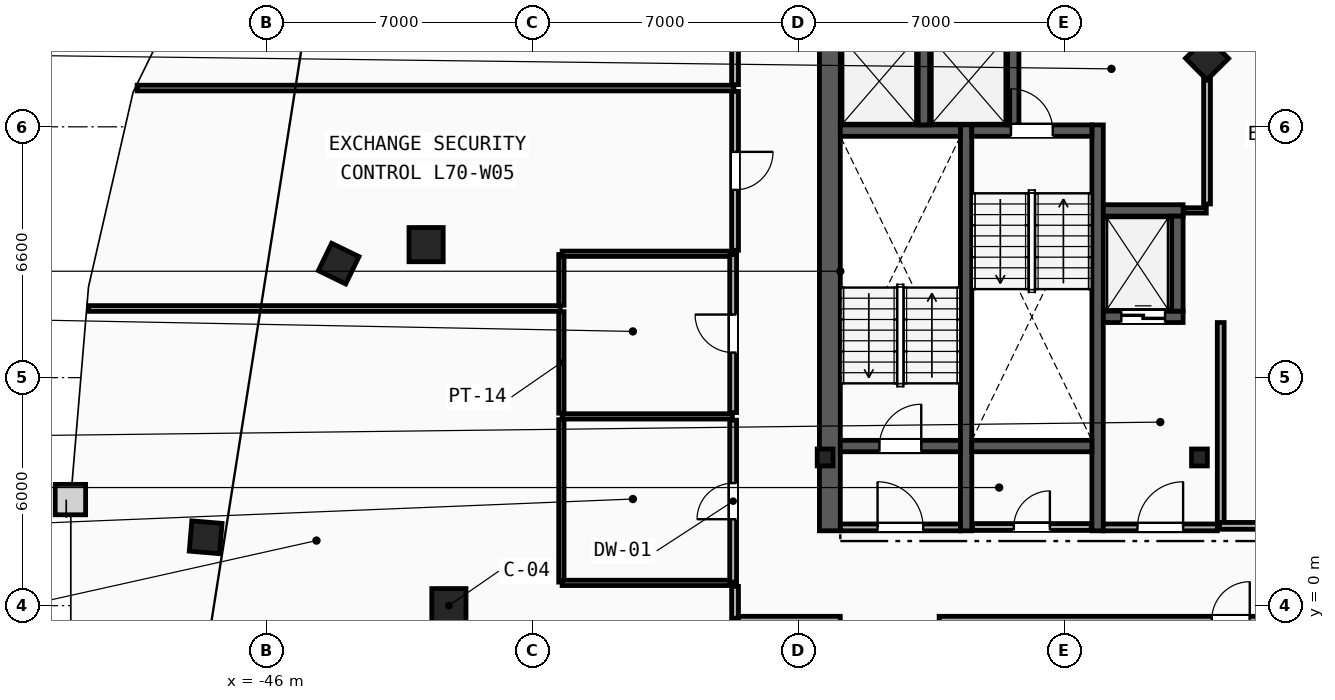
"""IFC4 building model, lengths in metres.
Left out: names, types, materials, properties, quantities, classifications, styles, units other than length and angle.
Written with IfcOpenShell. Run it as: python <this file> out.ifc"""

import sys

from ifc_helpers import new_model, si_unit, direction, frame, frame_2d, origin, origin_2d, place, context, subcontext, project, spatial, rectangle, i_section, extrude, element, fill, save


model = new_model("IFC4")
c1 = context("Model", 3, precision=1e-05, world=origin(), true_north=direction((0.0, 1.0)))
c2 = subcontext(c1, "Body", "Model", "MODEL_VIEW")
j1 = project(units=[si_unit("LENGTHUNIT", "METRE"), si_unit("PLANEANGLEUNIT", "RADIAN")], contexts=[c1])
p1 = place(None, origin())
s1 = spatial("IfcSite", under=j1, at=p1, CompositionType="ELEMENT")
p2 = place(p1, origin())
s2 = spatial("IfcBuilding", under=s1, at=p2, CompositionType="ELEMENT")
p3 = place(p2, frame((0.0, 0.0, 264.8)))
s3 = spatial("IfcBuildingStorey", under=s2, at=p3, CompositionType="ELEMENT", Elevation=264.8)
for number, where, z_axis, x_axis in (
    (1, (-31.3, 3.9, 0.0), (0.0, 0.0, 1.0), (1.0, 0.0, 0.0)),
    (2, (-21.45, 3.9, 0.0), (0.0, 0.0, 1.0), (1.0, 0.0, 0.0)),
):
    element("IfcColumn", number, at=place(p3, frame(where, z_axis=z_axis, x_axis=x_axis)), inside=s3, PredefinedType="COLUMN", context=c2, shape_type="SweptSolid", body=[
        extrude(i_section(OverallWidth=0.416, OverallDepth=0.446, WebThickness=0.039, FlangeThickness=0.063, FilletRadius=0.018, at=origin_2d()), origin(), (0.0, 0.0, 1.0), 3.6),
    ])
for number, where, z_axis, x_axis in (
    (3, (-41.2, 0.0, 0.0), (0.0, 0.0, 1.0), (1.0, 0.0, 0.0)),
    (4, (-41.8, 9.5, 0.0), (0.0, 0.0, 1.0), (1.0, 0.0, 0.0)),
):
    element("IfcColumn", number, at=place(p3, frame(where, z_axis=z_axis, x_axis=x_axis)), inside=s3, PredefinedType="COLUMN", context=c2, shape_type="SweptSolid", body=[
        extrude(rectangle(XDim=0.9, YDim=0.9, at=origin_2d()), origin(), (0.0, 0.0, 1.0), 3.6),
    ])
for number, where, z_axis, x_axis in (
    (5, (-21.25, 14.4, 0.0), (0.0, 0.0, 1.0), (-0.703, 0.711, 0.0)),
    (6, (-44.1, 9.0, 0.0), (0.0, 0.0, 1.0), (-0.437, -0.899, 0.0)),
    (7, (-47.6, 1.8, 0.0), (0.0, 0.0, 1.0), (-0.084, -0.997, 0.0)),
):
    element("IfcColumn", number, at=place(p3, frame(where, z_axis=z_axis, x_axis=x_axis)), inside=s3, PredefinedType="COLUMN", context=c2, shape_type="SweptSolid", body=[
        extrude(rectangle(XDim=0.8, YDim=0.8, at=origin_2d()), origin(), (0.0, 0.0, 1.0), 3.6),
    ])
p4 = place(p3, frame((-31.175, 1.97, 0.0), z_axis=(0.0, 0.0, 1.0), x_axis=(0.0, 1.0, 0.0)))
e8 = element("IfcWall", 8, at=p4, inside=s3, PredefinedType="SHEAR", context=c2, shape_type="SweptSolid", body=[
    extrude(rectangle(XDim=13.33, YDim=0.55, at=frame_2d((6.665, 0.0))), origin(), (0.0, 0.0, 1.0), 3.34),
])
for number, where, z_axis, x_axis in (
    (9, (-27.59, 1.97, 0.0), (0.0, 0.0, 1.0), (0.0, 1.0, 0.0)),
    (10, (-24.13, 1.97, 0.0), (0.0, 0.0, 1.0), (0.0, 1.0, 0.0)),
):
    element("IfcWall", number, at=place(p3, frame(where, z_axis=z_axis, x_axis=x_axis)), inside=s3, PredefinedType="SHEAR", context=c2, shape_type="SweptSolid", body=[
        extrude(rectangle(XDim=10.68, YDim=0.3, at=frame_2d((5.34, 0.0))), origin(), (0.0, 0.0, 1.0), 3.34),
    ])
p5 = place(p3, frame((-30.9, 4.2, 0.0), z_axis=(0.0, 0.0, 1.0), x_axis=(1.0, 0.0, 0.0)))
e11 = element("IfcWall", 11, at=p5, inside=s3, PredefinedType="SHEAR", context=c2, shape_type="SweptSolid", body=[
    extrude(rectangle(XDim=3.16, YDim=0.3, at=frame_2d((1.58, 0.0))), origin(), (0.0, 0.0, 1.0), 3.34),
])
p6 = place(p5, frame((1.03, 0.0, 0.0)))
e12 = element("IfcOpeningElement", 12, at=p6, cuts=e11, PredefinedType="OPENING", context=c2, shape_type="SweptSolid", body=[
    extrude(rectangle(XDim=1.1, YDim=2.15, at=frame_2d((0.55, 1.075))), frame((0.0, 0.16, 0.0), z_axis=(0.0, -1.0, 0.0), x_axis=(1.0, 0.0, 0.0)), (0.0, 0.0, 1.0), 0.32),
])
p7 = place(p3, frame((-30.9, 12.5, 0.0), z_axis=(0.0, 0.0, 1.0), x_axis=(1.0, 0.0, 0.0)))
e13 = element("IfcWall", 13, at=p7, inside=s3, PredefinedType="SHEAR", context=c2, shape_type="SweptSolid", body=[
    extrude(rectangle(XDim=3.16, YDim=0.3, at=frame_2d((1.58, 0.0))), origin(), (0.0, 0.0, 1.0), 3.34),
])
p8 = place(p3, frame((-27.44, 12.5, 0.0), z_axis=(0.0, 0.0, 1.0), x_axis=(1.0, 0.0, 0.0)))
e14 = element("IfcWall", 14, at=p8, inside=s3, PredefinedType="SHEAR", context=c2, shape_type="SweptSolid", body=[
    extrude(rectangle(XDim=3.16, YDim=0.3, at=frame_2d((1.58, 0.0))), origin(), (0.0, 0.0, 1.0), 3.34),
])
p9 = place(p8, frame((1.03, 0.0, 0.0)))
e15 = element("IfcOpeningElement", 15, at=p9, cuts=e14, PredefinedType="OPENING", context=c2, shape_type="SweptSolid", body=[
    extrude(rectangle(XDim=1.1, YDim=2.15, at=frame_2d((0.55, 1.075))), frame((0.0, 0.16, 0.0), z_axis=(0.0, -1.0, 0.0), x_axis=(1.0, 0.0, 0.0)), (0.0, 0.0, 1.0), 0.32),
])
p10 = place(p3, frame((-27.44, 4.2, 0.0), z_axis=(0.0, 0.0, 1.0), x_axis=(1.0, 0.0, 0.0)))
e16 = element("IfcWall", 16, at=p10, inside=s3, PredefinedType="SHEAR", context=c2, shape_type="SweptSolid", body=[
    extrude(rectangle(XDim=3.16, YDim=0.3, at=frame_2d((1.58, 0.0))), origin(), (0.0, 0.0, 1.0), 3.34),
])
p11 = place(p3, frame((-20.89, 2.15, 0.0), z_axis=(0.0, 0.0, 1.0), x_axis=(0.0, 1.0, 0.0)))
e17 = element("IfcWall", 17, at=p11, inside=s3, PredefinedType="PARTITIONING", context=c2, shape_type="SweptSolid", body=[
    extrude(rectangle(XDim=5.3, YDim=0.18, at=frame_2d((2.65, 0.0))), origin(), (0.0, 0.0, 1.0), 3.34),
])
p12 = place(p3, frame((-23.98, 2.06, 0.0), z_axis=(0.0, 0.0, 1.0), x_axis=(1.0, 0.0, 0.0)))
e18 = element("IfcWall", 18, at=p12, inside=s3, PredefinedType="PARTITIONING", context=c2, shape_type="SweptSolid", body=[
    extrude(rectangle(XDim=3.0, YDim=0.18, at=frame_2d((1.5, 0.0))), origin(), (0.0, 0.0, 1.0), 3.34),
])
p13 = place(p12, frame((0.9, 0.0, 0.0)))
e19 = element("IfcOpeningElement", 19, at=p13, cuts=e18, PredefinedType="OPENING", context=c2, shape_type="SweptSolid", body=[
    extrude(rectangle(XDim=1.2, YDim=2.15, at=frame_2d((0.6, 1.075))), frame((0.0, 0.1, 0.0), z_axis=(0.0, -1.0, 0.0), x_axis=(1.0, 0.0, 0.0)), (0.0, 0.0, 1.0), 0.2),
])
p14 = place(p3, frame((-30.9, 2.06, 0.0), z_axis=(0.0, 0.0, 1.0), x_axis=(1.0, 0.0, 0.0)))
e20 = element("IfcWall", 20, at=p14, inside=s3, PredefinedType="PARTITIONING", context=c2, shape_type="SweptSolid", body=[
    extrude(rectangle(XDim=3.16, YDim=0.18, at=frame_2d((1.58, 0.0))), origin(), (0.0, 0.0, 1.0), 3.34),
])
p15 = place(p14, frame((0.98, 0.0, 0.0)))
e21 = element("IfcOpeningElement", 21, at=p15, cuts=e20, PredefinedType="OPENING", context=c2, shape_type="SweptSolid", body=[
    extrude(rectangle(XDim=1.2, YDim=2.15, at=frame_2d((0.6, 1.075))), frame((0.0, 0.1, 0.0), z_axis=(0.0, -1.0, 0.0), x_axis=(1.0, 0.0, 0.0)), (0.0, 0.0, 1.0), 0.2),
])
p16 = place(p3, frame((-23.98, 7.6, 0.0), z_axis=(0.0, 0.0, 1.0), x_axis=(1.0, 0.0, 0.0)))
e22 = element("IfcWall", 22, at=p16, inside=s3, PredefinedType="SHEAR", context=c2, shape_type="SweptSolid", body=[
    extrude(rectangle(XDim=2.1, YDim=0.3, at=frame_2d((1.05, 0.0))), origin(), (0.0, 0.0, 1.0), 3.34),
])
p17 = place(p16, frame((0.475, 0.0, 0.0)))
e23 = element("IfcOpeningElement", 23, at=p17, cuts=e22, PredefinedType="OPENING", context=c2, shape_type="SweptSolid", body=[
    extrude(rectangle(XDim=1.15, YDim=2.2, at=frame_2d((0.575, 1.1))), frame((0.0, 0.16, 0.0), z_axis=(0.0, -1.0, 0.0), x_axis=(1.0, 0.0, 0.0)), (0.0, 0.0, 1.0), 0.32),
])
p18 = place(p3, frame((-23.98, 10.4, 0.0), z_axis=(0.0, 0.0, 1.0), x_axis=(1.0, 0.0, 0.0)))
e24 = element("IfcWall", 24, at=p18, inside=s3, PredefinedType="SHEAR", context=c2, shape_type="SweptSolid", body=[
    extrude(rectangle(XDim=2.1, YDim=0.3, at=frame_2d((1.05, 0.0))), origin(), (0.0, 0.0, 1.0), 3.34),
])
p19 = place(p3, frame((-22.03, 7.75, 0.0), z_axis=(0.0, 0.0, 1.0), x_axis=(0.0, 1.0, 0.0)))
e25 = element("IfcWall", 25, at=p19, inside=s3, PredefinedType="SHEAR", context=c2, shape_type="SweptSolid", body=[
    extrude(rectangle(XDim=2.5, YDim=0.3, at=frame_2d((1.25, 0.0))), origin(), (0.0, 0.0, 1.0), 3.34),
])
for number, where, z_axis, x_axis in (
    (26, (-28.7, 12.65, 0.0), (0.0, 0.0, 1.0), (0.0, 1.0, 0.0)),
    (27, (-26.35, 12.65, 0.0), (0.0, 0.0, 1.0), (0.0, 1.0, 0.0)),
):
    element("IfcWall", number, at=place(p3, frame(where, z_axis=z_axis, x_axis=x_axis)), inside=s3, PredefinedType="SHEAR", context=c2, shape_type="SweptSolid", body=[
        extrude(rectangle(XDim=2.3, YDim=0.3, at=frame_2d((1.15, 0.0))), origin(), (0.0, 0.0, 1.0), 3.34),
    ])
p20 = place(p3, frame((-21.86, 10.4, 0.0), z_axis=(0.0, 0.0, 1.0), x_axis=(1.0, 0.0, 0.0)))
e28 = element("IfcWall", 28, at=p20, inside=s3, PredefinedType="PARTITIONING", context=c2, shape_type="SweptSolid", body=[
    extrude(rectangle(XDim=0.59, YDim=0.14, at=frame_2d((0.295, 0.0))), origin(), (0.0, 0.0, 1.0), 3.34),
])
p21 = place(p3, frame((-21.25, 10.57, 0.0), z_axis=(0.0, 0.0, 1.0), x_axis=(0.0, 1.0, 0.0)))
e29 = element("IfcWall", 29, at=p21, inside=s3, PredefinedType="PARTITIONING", context=c2, shape_type="SweptSolid", body=[
    extrude(rectangle(XDim=4.36, YDim=0.18, at=frame_2d((2.18, 0.0))), origin(), (0.0, 0.0, 1.0), 3.34),
])
p22 = place(p3, frame((-27.42, 2.07, 0.0), z_axis=(0.0, 0.0, 1.0), x_axis=(1.0, 0.0, 0.0)))
e30 = element("IfcWall", 30, at=p22, inside=s3, PredefinedType="PARTITIONING", context=c2, shape_type="SweptSolid", body=[
    extrude(rectangle(XDim=3.12, YDim=0.18, at=frame_2d((1.56, 0.0))), origin(), (0.0, 0.0, 1.0), 3.34),
])
p23 = place(p22, frame((1.085, 0.0, 0.0)))
e31 = element("IfcOpeningElement", 31, at=p23, cuts=e30, PredefinedType="OPENING", context=c2, shape_type="SweptSolid", body=[
    extrude(rectangle(XDim=0.95, YDim=2.1, at=frame_2d((0.475, 1.05))), frame((0.0, 0.1, 0.0), z_axis=(0.0, -1.0, 0.0), x_axis=(1.0, 0.0, 0.0)), (0.0, 0.0, 1.0), 0.2),
])
p24 = place(p3, frame((-38.24, 0.62, 0.0), z_axis=(0.0, 0.0, 1.0), x_axis=(0.0, 1.0, 0.0)))
e32 = element("IfcWall", 32, at=p24, inside=s3, PredefinedType="PARTITIONING", context=c2, shape_type="SweptSolid", body=[
    extrude(rectangle(XDim=4.275, YDim=0.14, at=frame_2d((2.137, 0.0))), origin(), (0.0, 0.0, 1.0), 3.34),
])
p25 = place(p3, frame((-38.24, 5.065, 0.0), z_axis=(0.0, 0.0, 1.0), x_axis=(0.0, 1.0, 0.0)))
e33 = element("IfcWall", 33, at=p25, inside=s3, PredefinedType="PARTITIONING", context=c2, shape_type="SweptSolid", body=[
    extrude(rectangle(XDim=2.67, YDim=0.14, at=frame_2d((1.335, 0.0))), origin(), (0.0, 0.0, 1.0), 3.34),
])
p26 = place(p3, frame((-38.24, 7.905, 0.0), z_axis=(0.0, 0.0, 1.0), x_axis=(0.0, 1.0, 0.0)))
e34 = element("IfcWall", 34, at=p26, inside=s3, PredefinedType="PARTITIONING", context=c2, shape_type="SweptSolid", body=[
    extrude(rectangle(XDim=1.335, YDim=0.14, at=frame_2d((0.667, 0.0))), origin(), (0.0, 0.0, 1.0), 3.34),
])
for number, where, z_axis, x_axis in (
    (35, (-38.22, 0.6, 0.0), (0.0, 0.0, 1.0), (1.0, 0.0, 0.0)),
    (36, (-38.22, 4.98, 0.0), (0.0, 0.0, 1.0), (1.0, 0.0, 0.0)),
    (37, (-38.22, 9.26, 0.0), (0.0, 0.0, 1.0), (1.0, 0.0, 0.0)),
):
    element("IfcWall", number, at=place(p3, frame(where, z_axis=z_axis, x_axis=x_axis)), inside=s3, PredefinedType="PARTITIONING", context=c2, shape_type="SweptSolid", body=[
        extrude(rectangle(XDim=4.48, YDim=0.14, at=frame_2d((2.24, 0.0))), origin(), (0.0, 0.0, 1.0), 3.34),
    ])
p27 = place(p3, frame((-33.72, 0.62, 0.0), z_axis=(0.0, 0.0, 1.0), x_axis=(0.0, 1.0, 0.0)))
e38 = element("IfcWall", 38, at=p27, inside=s3, PredefinedType="PARTITIONING", context=c2, shape_type="SweptSolid", body=[
    extrude(rectangle(XDim=4.26, YDim=0.18, at=frame_2d((2.13, 0.0))), origin(), (0.0, 0.0, 1.0), 3.34),
])
p28 = place(p27, frame((1.655, 0.0, 0.0)))
e39 = element("IfcOpeningElement", 39, at=p28, cuts=e38, PredefinedType="OPENING", context=c2, shape_type="SweptSolid", body=[
    extrude(rectangle(XDim=0.95, YDim=2.1, at=frame_2d((0.475, 1.05))), frame((0.0, 0.1, 0.0), z_axis=(0.0, -1.0, 0.0), x_axis=(1.0, 0.0, 0.0)), (0.0, 0.0, 1.0), 0.2),
])
p29 = place(p3, frame((-33.72, 5.08, 0.0), z_axis=(0.0, 0.0, 1.0), x_axis=(0.0, 1.0, 0.0)))
e40 = element("IfcWall", 40, at=p29, inside=s3, PredefinedType="PARTITIONING", context=c2, shape_type="SweptSolid", body=[
    extrude(rectangle(XDim=4.16, YDim=0.18, at=frame_2d((2.08, 0.0))), origin(), (0.0, 0.0, 1.0), 3.34),
])
p30 = place(p29, frame((1.58, 0.0, 0.0)))
e41 = element("IfcOpeningElement", 41, at=p30, cuts=e40, PredefinedType="OPENING", context=c2, shape_type="SweptSolid", body=[
    extrude(rectangle(XDim=1.0, YDim=2.15, at=frame_2d((0.5, 1.075))), frame((0.0, 0.1, 0.0), z_axis=(0.0, -1.0, 0.0), x_axis=(1.0, 0.0, 0.0)), (0.0, 0.0, 1.0), 0.2),
])
p31 = place(p3, frame((-50.681, 7.82, 0.0), z_axis=(0.0, 0.0, 1.0), x_axis=(1.0, 0.0, 0.0)))
e42 = element("IfcWall", 42, at=p31, inside=s3, PredefinedType="PARTITIONING", context=c2, shape_type="SweptSolid", body=[
    extrude(rectangle(XDim=12.411, YDim=0.15, at=frame_2d((6.205, 0.0))), origin(), (0.0, 0.0, 1.0), 3.34),
])
p32 = place(p3, frame((-49.404, 13.62, 0.0), z_axis=(0.0, 0.0, 1.0), x_axis=(1.0, 0.0, 0.0)))
e43 = element("IfcWall", 43, at=p32, inside=s3, PredefinedType="PARTITIONING", context=c2, shape_type="SweptSolid", body=[
    extrude(rectangle(XDim=15.704, YDim=0.15, at=frame_2d((7.852, 0.0))), origin(), (0.0, 0.0, 1.0), 3.34),
])
p33 = place(p3, frame((-28.3, -0.37, 0.0), z_axis=(0.0, 0.0, 1.0), x_axis=(1.0, 0.0, 0.0)))
e44 = element("IfcWall", 44, at=p33, inside=s3, PredefinedType="PARTITIONING", context=c2, shape_type="SweptSolid", body=[
    extrude(rectangle(XDim=15.349, YDim=0.18, at=frame_2d((7.675, 0.0))), origin(), (0.0, 0.0, 1.0), 3.34),
])
p34 = place(p33, frame((7.175, 0.0, 0.0)))
e45 = element("IfcOpeningElement", 45, at=p34, cuts=e44, PredefinedType="OPENING", context=c2, shape_type="SweptSolid", body=[
    extrude(rectangle(XDim=1.0, YDim=2.15, at=frame_2d((0.5, 1.075))), frame((0.0, 0.1, 0.0), z_axis=(0.0, -1.0, 0.0), x_axis=(1.0, 0.0, 0.0)), (0.0, 0.0, 1.0), 0.2),
])
p35 = place(p3, frame((-33.628, -0.37, 0.0), z_axis=(0.0, 0.0, 1.0), x_axis=(1.0, 0.0, 0.0)))
e46 = element("IfcWall", 46, at=p35, inside=s3, PredefinedType="PARTITIONING", context=c2, shape_type="SweptSolid", body=[
    extrude(rectangle(XDim=2.729, YDim=0.18, at=frame_2d((1.364, 0.0))), origin(), (0.0, 0.0, 1.0), 3.34),
])
p36 = place(p3, frame((-33.67, 0.509, 0.0), z_axis=(0.0, 0.0, 1.0), x_axis=(0.0, -1.0, 0.0)))
e47 = element("IfcWall", 47, at=p36, inside=s3, PredefinedType="PARTITIONING", context=c2, shape_type="SweptSolid", body=[
    extrude(rectangle(XDim=0.837, YDim=0.18, at=frame_2d((0.418, 0.0))), origin(), (0.0, 0.0, 1.0), 3.34),
])
p37 = place(p3, frame((-33.67, 13.53, 0.0), z_axis=(0.0, 0.0, 1.0), x_axis=(0.0, -1.0, 0.0)))
e48 = element("IfcWall", 48, at=p37, inside=s3, PredefinedType="PARTITIONING", context=c2, shape_type="SweptSolid", body=[
    extrude(rectangle(XDim=4.179, YDim=0.18, at=frame_2d((2.089, 0.0))), origin(), (0.0, 0.0, 1.0), 3.34),
])
p38 = place(p37, frame((1.589, 0.0, 0.0)))
e49 = element("IfcOpeningElement", 49, at=p38, cuts=e48, PredefinedType="OPENING", context=c2, shape_type="SweptSolid", body=[
    extrude(rectangle(XDim=1.0, YDim=2.15, at=frame_2d((0.5, 1.075))), frame((0.0, 0.1, 0.0), z_axis=(0.0, -1.0, 0.0), x_axis=(1.0, 0.0, 0.0)), (0.0, 0.0, 1.0), 0.2),
])
p39 = place(p3, frame((-16.9, 2.1, 0.0), z_axis=(0.0, 0.0, 1.0), x_axis=(-1.0, 0.0, 0.0)))
e50 = element("IfcWall", 50, at=p39, inside=s3, PredefinedType="PARTITIONING", context=c2, shape_type="SweptSolid", body=[
    extrude(rectangle(XDim=4.02, YDim=0.18, at=frame_2d((2.01, 0.0))), origin(), (0.0, 0.0, 1.0), 3.34),
])
p40 = place(p39, frame((1.51, 0.0, 0.0)))
e51 = element("IfcOpeningElement", 51, at=p40, cuts=e50, PredefinedType="OPENING", context=c2, shape_type="SweptSolid", body=[
    extrude(rectangle(XDim=1.0, YDim=2.15, at=frame_2d((0.5, 1.075))), frame((0.0, 0.1, 0.0), z_axis=(0.0, -1.0, 0.0), x_axis=(1.0, 0.0, 0.0)), (0.0, 0.0, 1.0), 0.2),
])
p41 = place(p3, frame((-33.67, 17.428, 0.0), z_axis=(0.0, 0.0, 1.0), x_axis=(0.0, -1.0, 0.0)))
e52 = element("IfcWall", 52, at=p41, inside=s3, PredefinedType="PARTITIONING", context=c2, shape_type="SweptSolid", body=[
    extrude(rectangle(XDim=3.719, YDim=0.18, at=frame_2d((1.859, 0.0))), origin(), (0.0, 0.0, 1.0), 3.34),
])
p42 = place(p41, frame((1.359, 0.0, 0.0)))
e53 = element("IfcOpeningElement", 53, at=p42, cuts=e52, PredefinedType="OPENING", context=c2, shape_type="SweptSolid", body=[
    extrude(rectangle(XDim=1.0, YDim=2.15, at=frame_2d((0.5, 1.075))), frame((0.0, 0.1, 0.0), z_axis=(0.0, -1.0, 0.0), x_axis=(1.0, 0.0, 0.0)), (0.0, 0.0, 1.0), 0.2),
])
p43 = place(p6, origin())
e54 = element("IfcDoor", 54, at=p43, inside=s3, OperationType="SINGLE_SWING_RIGHT", PredefinedType="DOOR", context=c2, shape_type="SweptSolid", body=[
    extrude(rectangle(XDim=1.1, YDim=2.15, at=frame_2d((0.55, 1.075))), frame((0.0, 0.025, 0.0), z_axis=(0.0, -1.0, 0.0), x_axis=(1.0, 0.0, 0.0)), (0.0, 0.0, 1.0), 0.05),
])
fill(e12, e54)
p44 = place(p9, origin())
e55 = element("IfcDoor", 55, at=p44, inside=s3, OperationType="SINGLE_SWING_LEFT", PredefinedType="DOOR", context=c2, shape_type="SweptSolid", body=[
    extrude(rectangle(XDim=1.1, YDim=2.15, at=frame_2d((0.55, 1.075))), frame((0.0, 0.025, 0.0), z_axis=(0.0, -1.0, 0.0), x_axis=(1.0, 0.0, 0.0)), (0.0, 0.0, 1.0), 0.05),
])
fill(e15, e55)
p45 = place(p13, origin())
e56 = element("IfcDoor", 56, at=p45, inside=s3, OperationType="SINGLE_SWING_RIGHT", PredefinedType="DOOR", context=c2, shape_type="SweptSolid", body=[
    extrude(rectangle(XDim=1.2, YDim=2.15, at=frame_2d((0.6, 1.075))), frame((0.0, 0.025, 0.0), z_axis=(0.0, -1.0, 0.0), x_axis=(1.0, 0.0, 0.0)), (0.0, 0.0, 1.0), 0.05),
])
fill(e19, e56)
p46 = place(p15, origin())
e57 = element("IfcDoor", 57, at=p46, inside=s3, OperationType="SINGLE_SWING_LEFT", PredefinedType="DOOR", context=c2, shape_type="SweptSolid", body=[
    extrude(rectangle(XDim=1.2, YDim=2.15, at=frame_2d((0.6, 1.075))), frame((0.0, 0.025, 0.0), z_axis=(0.0, -1.0, 0.0), x_axis=(1.0, 0.0, 0.0)), (0.0, 0.0, 1.0), 0.05),
])
fill(e21, e57)
p47 = place(p17, origin())
e58 = element("IfcDoor", 58, at=p47, inside=s3, OperationType="SLIDING_TO_LEFT", PredefinedType="TRAPDOOR", context=c2, shape_type="SweptSolid", body=[
    extrude(rectangle(XDim=1.15, YDim=2.2, at=frame_2d((0.575, 1.1))), frame((0.0, 0.025, 0.0), z_axis=(0.0, -1.0, 0.0), x_axis=(1.0, 0.0, 0.0)), (0.0, 0.0, 1.0), 0.05),
])
fill(e23, e58)
p48 = place(p34, origin())
e59 = element("IfcDoor", 59, at=p48, inside=s3, OperationType="SINGLE_SWING_RIGHT", PredefinedType="DOOR", context=c2, shape_type="SweptSolid", body=[
    extrude(rectangle(XDim=1.0, YDim=2.15, at=frame_2d((0.5, 1.075))), frame((0.0, 0.025, 0.0), z_axis=(0.0, -1.0, 0.0), x_axis=(1.0, 0.0, 0.0)), (0.0, 0.0, 1.0), 0.05),
])
fill(e45, e59)
p49 = place(p28, origin())
e60 = element("IfcDoor", 60, at=p49, inside=s3, OperationType="SINGLE_SWING_LEFT", PredefinedType="DOOR", context=c2, shape_type="SweptSolid", body=[
    extrude(rectangle(XDim=0.95, YDim=2.1, at=frame_2d((0.475, 1.05))), frame((0.0, 0.025, 0.0), z_axis=(0.0, -1.0, 0.0), x_axis=(1.0, 0.0, 0.0)), (0.0, 0.0, 1.0), 0.05),
])
fill(e39, e60)
p50 = place(p38, origin())
e61 = element("IfcDoor", 61, at=p50, inside=s3, OperationType="SINGLE_SWING_LEFT", PredefinedType="DOOR", context=c2, shape_type="SweptSolid", body=[
    extrude(rectangle(XDim=1.0, YDim=2.15, at=frame_2d((0.5, 1.075))), frame((0.0, 0.025, 0.0), z_axis=(0.0, -1.0, 0.0), x_axis=(1.0, 0.0, 0.0)), (0.0, 0.0, 1.0), 0.05),
])
fill(e49, e61)
p51 = place(p30, origin())
e62 = element("IfcDoor", 62, at=p51, inside=s3, OperationType="SINGLE_SWING_RIGHT", PredefinedType="DOOR", context=c2, shape_type="SweptSolid", body=[
    extrude(rectangle(XDim=1.0, YDim=2.15, at=frame_2d((0.5, 1.075))), frame((0.0, 0.025, 0.0), z_axis=(0.0, -1.0, 0.0), x_axis=(1.0, 0.0, 0.0)), (0.0, 0.0, 1.0), 0.05),
])
fill(e41, e62)
p52 = place(p23, origin())
e63 = element("IfcDoor", 63, at=p52, inside=s3, OperationType="SINGLE_SWING_RIGHT", PredefinedType="DOOR", context=c2, shape_type="SweptSolid", body=[
    extrude(rectangle(XDim=0.95, YDim=2.1, at=frame_2d((0.475, 1.05))), frame((0.0, 0.025, 0.0), z_axis=(0.0, -1.0, 0.0), x_axis=(1.0, 0.0, 0.0)), (0.0, 0.0, 1.0), 0.05),
])
fill(e31, e63)
save(model, sys.argv[1])
